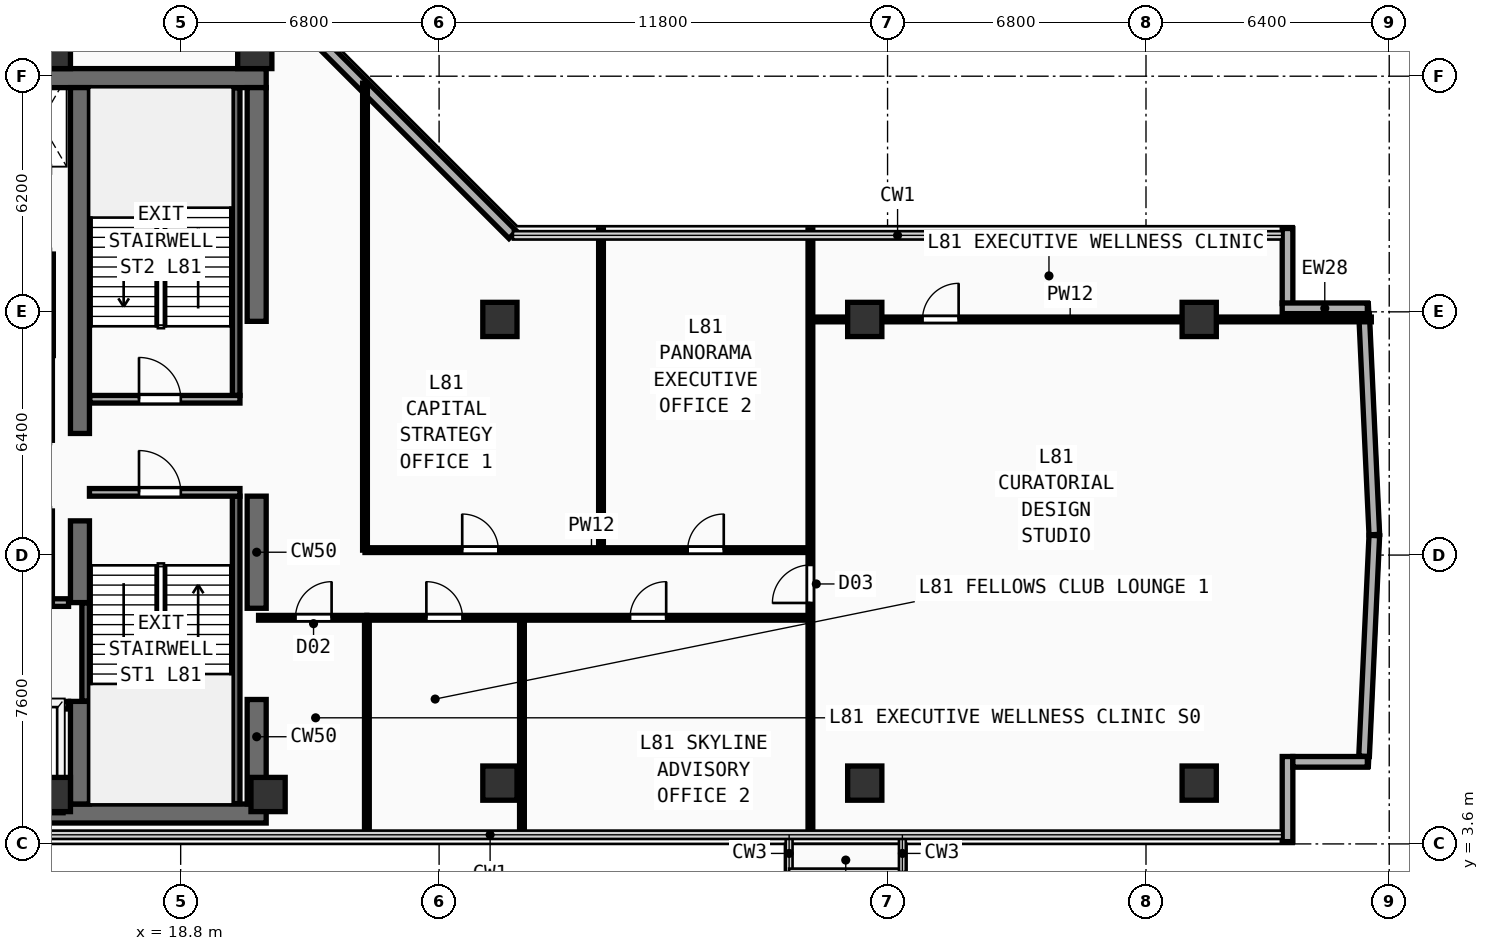
"""IFC4 building model, lengths in metres.
Left out: names, types, materials, properties, quantities, classifications, styles, units other than length and angle.
Written with IfcOpenShell. Run it as: python <this file> out.ifc"""

import sys

from ifc_helpers import new_model, si_unit, direction, frame, frame_2d, origin, origin_2d, place, context, subcontext, project, spatial, rectangle, extrude, element, fill, save


model = new_model("IFC4")
c1 = context("Model", 3, precision=1e-05, world=origin(), true_north=direction((0.0, 1.0)))
c2 = subcontext(c1, "Body", "Model", "MODEL_VIEW")
j1 = project(units=[si_unit("LENGTHUNIT", "METRE"), si_unit("PLANEANGLEUNIT", "RADIAN")], contexts=[c1])
p1 = place(None, origin())
s1 = spatial("IfcSite", under=j1, at=p1, CompositionType="ELEMENT")
p2 = place(p1, origin())
s2 = spatial("IfcBuilding", under=s1, at=p2, CompositionType="ELEMENT")
p3 = place(p2, frame((0.0, 0.0, 316.0)))
s3 = spatial("IfcBuildingStorey", under=s2, at=p3, CompositionType="ELEMENT", Elevation=316.0)
for number, where, z_axis, x_axis in (
    (1, (7.2, 4.4, 0.0), (0.0, 0.0, 1.0), (1.0, 0.0, 0.0)),
    (2, (7.2, 23.75, 0.0), (0.0, 0.0, 1.0), (1.0, 0.0, 0.0)),
):
    element("IfcWall", number, at=place(p3, frame(where, z_axis=z_axis, x_axis=x_axis)), inside=s3, PredefinedType="SHEAR", context=c2, shape_type="SweptSolid", body=[
        extrude(rectangle(XDim=13.85, YDim=0.5, at=frame_2d((6.925, 0.0))), origin(), (0.0, 0.0, 1.0), 3.56),
    ])
p4 = place(p3, frame((20.8, 4.65, 0.0), z_axis=(0.0, 0.0, 1.0), x_axis=(0.0, 1.0, 0.0)))
e3 = element("IfcWall", 3, at=p4, inside=s3, PredefinedType="SHEAR", context=c2, shape_type="SweptSolid", body=[
    extrude(rectangle(XDim=2.75, YDim=0.5, at=frame_2d((1.375, 0.0))), origin(), (0.0, 0.0, 1.0), 3.56),
])
p5 = place(p3, frame((20.8, 9.8, 0.0), z_axis=(0.0, 0.0, 1.0), x_axis=(0.0, 1.0, 0.0)))
e4 = element("IfcWall", 4, at=p5, inside=s3, PredefinedType="SHEAR", context=c2, shape_type="SweptSolid", body=[
    extrude(rectangle(XDim=2.95, YDim=0.5, at=frame_2d((1.475, 0.0))), origin(), (0.0, 0.0, 1.0), 3.56),
])
p6 = place(p3, frame((20.8, 17.35, 0.0), z_axis=(0.0, 0.0, 1.0), x_axis=(0.0, 1.0, 0.0)))
e5 = element("IfcWall", 5, at=p6, inside=s3, PredefinedType="SHEAR", context=c2, shape_type="SweptSolid", body=[
    extrude(rectangle(XDim=6.15, YDim=0.5, at=frame_2d((3.075, 0.0))), origin(), (0.0, 0.0, 1.0), 3.56),
])
p7 = place(p3, frame((16.15, 4.65, 0.0), z_axis=(0.0, 0.0, 1.0), x_axis=(0.0, 1.0, 0.0)))
e6 = element("IfcWall", 6, at=p7, inside=s3, PredefinedType="SHEAR", context=c2, shape_type="SweptSolid", body=[
    extrude(rectangle(XDim=2.7, YDim=0.5, at=frame_2d((1.35, 0.0))), origin(), (0.0, 0.0, 1.0), 3.56),
])
p8 = place(p3, frame((16.15, 9.95, 0.0), z_axis=(0.0, 0.0, 1.0), x_axis=(0.0, 1.0, 0.0)))
e7 = element("IfcWall", 7, at=p8, inside=s3, PredefinedType="SHEAR", context=c2, shape_type="SweptSolid", body=[
    extrude(rectangle(XDim=2.15, YDim=0.5, at=frame_2d((1.075, 0.0))), origin(), (0.0, 0.0, 1.0), 3.56),
])
p9 = place(p3, frame((16.15, 14.4, 0.0), z_axis=(0.0, 0.0, 1.0), x_axis=(0.0, 1.0, 0.0)))
e8 = element("IfcWall", 8, at=p9, inside=s3, PredefinedType="SHEAR", context=c2, shape_type="SweptSolid", body=[
    extrude(rectangle(XDim=9.1, YDim=0.5, at=frame_2d((4.55, 0.0))), origin(), (0.0, 0.0, 1.0), 3.56),
])
for number, where, z_axis, x_axis in (
    (9, (15.45, 4.9, 0.0), (0.0, 0.0, 1.0), (1.0, 0.0, 0.0)),
    (10, (21.1, 4.9, 0.0), (0.0, 0.0, 1.0), (1.0, 0.0, 0.0)),
    (11, (15.45, 24.45, 0.0), (0.0, 0.0, 1.0), (1.0, 0.0, 0.0)),
    (12, (20.75, 24.45, 0.0), (0.0, 0.0, 1.0), (1.0, 0.0, 0.0)),
    (13, (27.2, 5.2, 0.0), (0.0, 0.0, 1.0), (1.0, 0.0, 0.0)),
    (14, (36.8, 5.2, 0.0), (0.0, 0.0, 1.0), (1.0, 0.0, 0.0)),
    (15, (45.6, 5.2, 0.0), (0.0, 0.0, 1.0), (1.0, 0.0, 0.0)),
    (16, (27.2, 17.4, 0.0), (0.0, 0.0, 1.0), (1.0, 0.0, 0.0)),
    (17, (36.8, 17.4, 0.0), (0.0, 0.0, 1.0), (1.0, 0.0, 0.0)),
    (18, (45.6, 17.4, 0.0), (0.0, 0.0, 1.0), (1.0, 0.0, 0.0)),
):
    element("IfcColumn", number, at=place(p3, frame(where, z_axis=z_axis, x_axis=x_axis)), inside=s3, PredefinedType="COLUMN", context=c2, shape_type="SweptSolid", body=[
        extrude(rectangle(XDim=0.9, YDim=0.9, at=origin_2d()), origin(), (0.0, 0.0, 1.0), 3.56),
    ])
p10 = place(p3, frame((47.924, 3.66, 0.0), z_axis=(0.0, 0.0, 1.0), x_axis=(0.0, 1.0, 0.0)))
e19 = element("IfcWall", 19, at=p10, inside=s3, PredefinedType="SOLIDWALL", context=c2, shape_type="SweptSolid", body=[
    extrude(rectangle(XDim=2.24, YDim=0.28, at=frame_2d((1.12, 0.0))), origin(), (0.0, 0.0, 1.0), 3.56),
])
p11 = place(p3, frame((48.064, 5.76, 0.0), z_axis=(0.0, 0.0, 1.0), x_axis=(1.0, 0.0, 0.0)))
e20 = element("IfcWall", 20, at=p11, inside=s3, PredefinedType="SOLIDWALL", context=c2, shape_type="SweptSolid", body=[
    extrude(rectangle(XDim=1.96, YDim=0.28, at=frame_2d((0.98, 0.0))), origin(), (0.0, 0.0, 1.0), 3.56),
])
p12 = place(p3, frame((47.924, 17.818, 0.0), z_axis=(0.0, 0.0, 1.0), x_axis=(0.0, 1.0, 0.0)))
e21 = element("IfcWall", 21, at=p12, inside=s3, PredefinedType="SOLIDWALL", context=c2, shape_type="SweptSolid", body=[
    extrude(rectangle(XDim=1.975, YDim=0.28, at=frame_2d((0.987, 0.0))), origin(), (0.0, 0.0, 1.0), 3.56),
])
p13 = place(p3, frame((47.784, 17.693, 0.0), z_axis=(0.0, 0.0, 1.0), x_axis=(1.0, 0.0, 0.0)))
e22 = element("IfcWall", 22, at=p13, inside=s3, PredefinedType="SOLIDWALL", context=c2, shape_type="SweptSolid", body=[
    extrude(rectangle(XDim=2.24, YDim=0.28, at=frame_2d((1.12, 0.0))), origin(), (0.0, 0.0, 1.0), 3.56),
])
p14 = place(p3, frame((27.538, 19.628, 0.0), z_axis=(0.0, 0.0, 1.0), x_axis=(-0.707106781187, 0.707106781187, 0.0)))
e23 = element("IfcWall", 23, at=p14, inside=s3, PredefinedType="SOLIDWALL", context=c2, shape_type="SweptSolid", body=[
    extrude(rectangle(XDim=9.207, YDim=0.28, at=frame_2d((4.603, 0.0))), origin(), (0.0, 0.0, 1.0), 3.56),
])
p15 = place(p3, frame((49.938, 5.907, 0.0), z_axis=(0.0, 0.0, 1.0), x_axis=(0.046325924779, 0.998926378015, 0.0)))
e24 = element("IfcWall", 24, at=p15, inside=s3, PredefinedType="SOLIDWALL", context=c2, shape_type="SweptSolid", body=[
    extrude(rectangle(XDim=5.813, YDim=0.28, at=frame_2d((2.906, 0.0))), origin(), (0.0, 0.0, 1.0), 3.56),
])
p16 = place(p3, frame((50.208, 11.739, 0.0), z_axis=(0.0, 0.0, 1.0), x_axis=(-0.046327868457, 0.998926287873, 0.0)))
e25 = element("IfcWall", 25, at=p16, inside=s3, PredefinedType="SOLIDWALL", context=c2, shape_type="SweptSolid", body=[
    extrude(rectangle(XDim=5.813, YDim=0.28, at=frame_2d((2.906, 0.0))), origin(), (0.0, 0.0, 1.0), 3.56),
])
p17 = place(p3, frame((16.3, 7.36, 0.0), z_axis=(0.0, 0.0, 1.0), x_axis=(0.0, 1.0, 0.0)))
e26 = element("IfcWall", 26, at=p17, inside=s3, PredefinedType="SHEAR", context=c2, shape_type="SweptSolid", body=[
    extrude(rectangle(XDim=2.58, YDim=0.2, at=frame_2d((1.29, 0.0))), origin(), (0.0, 0.0, 1.0), 3.56),
])
p18 = place(p3, frame((20.26, 4.66, 0.0), z_axis=(0.0, 0.0, 1.0), x_axis=(0.0, 1.0, 0.0)))
e27 = element("IfcWall", 27, at=p18, inside=s3, PredefinedType="SHEAR", context=c2, shape_type="SweptSolid", body=[
    extrude(rectangle(XDim=8.09, YDim=0.2, at=frame_2d((4.045, 0.0))), origin(), (0.0, 0.0, 1.0), 3.56),
])
p19 = place(p3, frame((16.4, 12.85, 0.0), z_axis=(0.0, 0.0, 1.0), x_axis=(1.0, 0.0, 0.0)))
e28 = element("IfcWall", 28, at=p19, inside=s3, PredefinedType="PARTITIONING", context=c2, shape_type="SweptSolid", body=[
    extrude(rectangle(XDim=3.96, YDim=0.2, at=frame_2d((1.98, 0.0))), origin(), (0.0, 0.0, 1.0), 3.56),
])
p20 = place(p19, frame((1.304, 0.0, 0.0)))
e29 = element("IfcOpeningElement", 29, at=p20, cuts=e28, PredefinedType="OPENING", context=c2, shape_type="SweptSolid", body=[
    extrude(rectangle(XDim=1.1, YDim=2.2, at=frame_2d((0.55, 1.1))), frame((0.0, 0.11, 0.0), z_axis=(0.0, -1.0, 0.0), x_axis=(1.0, 0.0, 0.0)), (0.0, 0.0, 1.0), 0.22),
])
p21 = place(p3, frame((20.26, 15.4, 0.0), z_axis=(0.0, 0.0, 1.0), x_axis=(0.0, 1.0, 0.0)))
e30 = element("IfcWall", 30, at=p21, inside=s3, PredefinedType="SHEAR", context=c2, shape_type="SweptSolid", body=[
    extrude(rectangle(XDim=8.09, YDim=0.2, at=frame_2d((4.045, 0.0))), origin(), (0.0, 0.0, 1.0), 3.56),
])
p22 = place(p3, frame((16.41, 15.3, 0.0), z_axis=(0.0, 0.0, 1.0), x_axis=(1.0, 0.0, 0.0)))
e31 = element("IfcWall", 31, at=p22, inside=s3, PredefinedType="PARTITIONING", context=c2, shape_type="SweptSolid", body=[
    extrude(rectangle(XDim=3.95, YDim=0.2, at=frame_2d((1.975, 0.0))), origin(), (0.0, 0.0, 1.0), 3.56),
])
p23 = place(p22, frame((1.294, 0.0, 0.0)))
e32 = element("IfcOpeningElement", 32, at=p23, cuts=e31, PredefinedType="OPENING", context=c2, shape_type="SweptSolid", body=[
    extrude(rectangle(XDim=1.1, YDim=2.2, at=frame_2d((0.55, 1.1))), frame((0.0, 0.11, 0.0), z_axis=(0.0, -1.0, 0.0), x_axis=(1.0, 0.0, 0.0)), (0.0, 0.0, 1.0), 0.22),
])
p24 = place(p3, frame((7.5, 7.25, 0.0), z_axis=(0.0, 0.0, 1.0), x_axis=(1.0, 0.0, 0.0)))
e33 = element("IfcWall", 33, at=p24, inside=s3, PredefinedType="PARTITIONING", context=c2, shape_type="SweptSolid", body=[
    extrude(rectangle(XDim=8.35, YDim=0.2, at=frame_2d((4.175, 0.0))), origin(), (0.0, 0.0, 1.0), 3.56),
])
p25 = place(p24, frame((0.53, 0.0, 0.0)))
e34 = element("IfcOpeningElement", 34, at=p25, cuts=e33, PredefinedType="OPENING", context=c2, shape_type="SweptSolid", body=[
    extrude(rectangle(XDim=1.1, YDim=2.2, at=frame_2d((0.55, 1.1))), frame((0.0, 0.11, 0.0), z_axis=(0.0, -1.0, 0.0), x_axis=(1.0, 0.0, 0.0)), (0.0, 0.0, 1.0), 0.22),
])
p26 = place(p24, frame((2.37, 0.0, 0.0)))
e35 = element("IfcOpeningElement", 35, at=p26, cuts=e33, PredefinedType="OPENING", context=c2, shape_type="SweptSolid", body=[
    extrude(rectangle(XDim=1.1, YDim=2.2, at=frame_2d((0.55, 1.1))), frame((0.0, 0.11, 0.0), z_axis=(0.0, -1.0, 0.0), x_axis=(1.0, 0.0, 0.0)), (0.0, 0.0, 1.0), 0.22),
])
p27 = place(p24, frame((4.33, 0.0, 0.0)))
e36 = element("IfcOpeningElement", 36, at=p27, cuts=e33, PredefinedType="OPENING", context=c2, shape_type="SweptSolid", body=[
    extrude(rectangle(XDim=1.1, YDim=2.2, at=frame_2d((0.55, 1.1))), frame((0.0, 0.11, 0.0), z_axis=(0.0, -1.0, 0.0), x_axis=(1.0, 0.0, 0.0)), (0.0, 0.0, 1.0), 0.22),
])
p28 = place(p24, frame((6.5, 0.0, 0.0)))
e37 = element("IfcOpeningElement", 37, at=p28, cuts=e33, PredefinedType="OPENING", context=c2, shape_type="SweptSolid", body=[
    extrude(rectangle(XDim=1.1, YDim=2.2, at=frame_2d((0.55, 1.1))), frame((0.0, 0.11, 0.0), z_axis=(0.0, -1.0, 0.0), x_axis=(1.0, 0.0, 0.0)), (0.0, 0.0, 1.0), 0.22),
])
p29 = place(p3, frame((7.5, 9.95, 0.0), z_axis=(0.0, 0.0, 1.0), x_axis=(1.0, 0.0, 0.0)))
e38 = element("IfcWall", 38, at=p29, inside=s3, PredefinedType="PARTITIONING", context=c2, shape_type="SweptSolid", body=[
    extrude(rectangle(XDim=8.35, YDim=0.2, at=frame_2d((4.175, 0.0))), origin(), (0.0, 0.0, 1.0), 3.56),
])
p30 = place(p3, frame((15.35, 9.95, 0.0), z_axis=(0.0, 0.0, 1.0), x_axis=(0.0, 1.0, 0.0)))
e39 = element("IfcWall", 39, at=p30, inside=s3, PredefinedType="PARTITIONING", context=c2, shape_type="SweptSolid", body=[
    extrude(rectangle(XDim=2.41, YDim=0.15, at=frame_2d((1.205, 0.0))), origin(), (0.0, 0.0, 1.0), 3.56),
])
p31 = place(p3, frame((15.35, 14.22, 0.0), z_axis=(0.0, 0.0, 1.0), x_axis=(0.0, 1.0, 0.0)))
e40 = element("IfcWall", 40, at=p31, inside=s3, PredefinedType="PARTITIONING", context=c2, shape_type="SweptSolid", body=[
    extrude(rectangle(XDim=2.23, YDim=0.15, at=frame_2d((1.115, 0.0))), origin(), (0.0, 0.0, 1.0), 3.56),
])
p32 = place(p3, frame((15.35, 16.45, 0.0), z_axis=(0.0, 0.0, 1.0), x_axis=(0.0, 1.0, 0.0)))
e41 = element("IfcWall", 41, at=p32, inside=s3, PredefinedType="PARTITIONING", context=c2, shape_type="SweptSolid", body=[
    extrude(rectangle(XDim=2.67, YDim=0.2, at=frame_2d((1.335, 0.0))), origin(), (0.0, 0.0, 1.0), 3.56),
])
p33 = place(p3, frame((20.85, 9.55, 0.0), z_axis=(0.0, 0.0, 1.0), x_axis=(1.0, 0.0, 0.0)))
e42 = element("IfcWall", 42, at=p33, inside=s3, PredefinedType="PARTITIONING", context=c2, shape_type="SweptSolid", body=[
    extrude(rectangle(XDim=2.85, YDim=0.125, at=frame_2d((1.425, 0.0))), origin(), (0.0, 0.0, 1.0), 3.26),
])
p34 = place(p33, frame((0.971, 0.0, 0.0)))
e43 = element("IfcOpeningElement", 43, at=p34, cuts=e42, PredefinedType="OPENING", context=c2, shape_type="SweptSolid", body=[
    extrude(rectangle(XDim=0.95, YDim=2.15, at=frame_2d((0.475, 1.075))), frame((0.0, 0.073, 0.0), z_axis=(0.0, -1.0, 0.0), x_axis=(1.0, 0.0, 0.0)), (0.0, 0.0, 1.0), 0.145),
])
p35 = place(p3, frame((23.7, 3.84, 0.0), z_axis=(0.0, 0.0, 1.0), x_axis=(0.0, 1.0, 0.0)))
e44 = element("IfcWall", 44, at=p35, inside=s3, PredefinedType="PARTITIONING", context=c2, shape_type="SweptSolid", body=[
    extrude(rectangle(XDim=5.71, YDim=0.125, at=frame_2d((2.855, 0.0))), origin(), (0.0, 0.0, 1.0), 3.56),
])
p36 = place(p3, frame((23.7, 9.55, 0.0), z_axis=(0.0, 0.0, 1.0), x_axis=(1.0, 0.0, 0.0)))
e45 = element("IfcWall", 45, at=p36, inside=s3, PredefinedType="PARTITIONING", context=c2, shape_type="SweptSolid", body=[
    extrude(rectangle(XDim=11.67, YDim=0.125, at=frame_2d((5.835, 0.0))), origin(), (0.0, 0.0, 1.0), 3.26),
])
p37 = place(p36, frame((1.565, 0.0, 0.0)))
e46 = element("IfcOpeningElement", 46, at=p37, cuts=e45, PredefinedType="OPENING", context=c2, shape_type="SweptSolid", body=[
    extrude(rectangle(XDim=0.95, YDim=2.15, at=frame_2d((0.475, 1.075))), frame((0.0, 0.073, 0.0), z_axis=(0.0, -1.0, 0.0), x_axis=(1.0, 0.0, 0.0)), (0.0, 0.0, 1.0), 0.145),
])
p38 = place(p36, frame((6.925, 0.0, 0.0)))
e47 = element("IfcOpeningElement", 47, at=p38, cuts=e45, PredefinedType="OPENING", context=c2, shape_type="SweptSolid", body=[
    extrude(rectangle(XDim=0.95, YDim=2.15, at=frame_2d((0.475, 1.075))), frame((0.0, 0.073, 0.0), z_axis=(0.0, -1.0, 0.0), x_axis=(1.0, 0.0, 0.0)), (0.0, 0.0, 1.0), 0.145),
])
p39 = place(p3, frame((27.78, 3.84, 0.0), z_axis=(0.0, 0.0, 1.0), x_axis=(0.0, 1.0, 0.0)))
e48 = element("IfcWall", 48, at=p39, inside=s3, PredefinedType="PARTITIONING", context=c2, shape_type="SweptSolid", body=[
    extrude(rectangle(XDim=5.71, YDim=0.125, at=frame_2d((2.855, 0.0))), origin(), (0.0, 0.0, 1.0), 3.56),
])
p40 = place(p3, frame((35.37, 3.84, 0.0), z_axis=(0.0, 0.0, 1.0), x_axis=(0.0, 1.0, 0.0)))
e49 = element("IfcWall", 49, at=p40, inside=s3, PredefinedType="PARTITIONING", context=c2, shape_type="SweptSolid", body=[
    extrude(rectangle(XDim=15.92, YDim=0.125, at=frame_2d((7.96, 0.0))), origin(), (0.0, 0.0, 1.0), 3.56),
])
p41 = place(p40, frame((6.1, 0.0, 0.0)))
e50 = element("IfcOpeningElement", 50, at=p41, cuts=e49, PredefinedType="OPENING", context=c2, shape_type="SweptSolid", body=[
    extrude(rectangle(XDim=1.0, YDim=2.2, at=frame_2d((0.5, 1.1))), frame((0.0, 0.073, 0.0), z_axis=(0.0, -1.0, 0.0), x_axis=(1.0, 0.0, 0.0)), (0.0, 0.0, 1.0), 0.145),
])
p42 = place(p3, frame((35.37, 17.4, 0.0), z_axis=(0.0, 0.0, 1.0), x_axis=(1.0, 0.0, 0.0)))
e51 = element("IfcWall", 51, at=p42, inside=s3, PredefinedType="PARTITIONING", context=c2, shape_type="SweptSolid", body=[
    extrude(rectangle(XDim=14.758, YDim=0.125, at=frame_2d((7.379, 0.0))), origin(), (0.0, 0.0, 1.0), 3.26),
])
p43 = place(p42, frame((2.95, 0.0, 0.0)))
e52 = element("IfcOpeningElement", 52, at=p43, cuts=e51, PredefinedType="OPENING", context=c2, shape_type="SweptSolid", body=[
    extrude(rectangle(XDim=0.95, YDim=2.15, at=frame_2d((0.475, 1.075))), frame((0.0, 0.073, 0.0), z_axis=(0.0, -1.0, 0.0), x_axis=(1.0, 0.0, 0.0)), (0.0, 0.0, 1.0), 0.145),
])
p44 = place(p3, frame((23.65, 11.33, 0.0), z_axis=(0.0, 0.0, 1.0), x_axis=(0.0, 1.0, 0.0)))
e53 = element("IfcWall", 53, at=p44, inside=s3, PredefinedType="PARTITIONING", context=c2, shape_type="SweptSolid", body=[
    extrude(rectangle(XDim=12.285, YDim=0.125, at=frame_2d((6.143, 0.0))), origin(), (0.0, 0.0, 1.0), 3.56),
])
p45 = place(p3, frame((23.65, 11.33, 0.0), z_axis=(0.0, 0.0, 1.0), x_axis=(1.0, 0.0, 0.0)))
e54 = element("IfcWall", 54, at=p45, inside=s3, PredefinedType="PARTITIONING", context=c2, shape_type="SweptSolid", body=[
    extrude(rectangle(XDim=11.72, YDim=0.125, at=frame_2d((5.86, 0.0))), origin(), (0.0, 0.0, 1.0), 3.56),
])
p46 = place(p45, frame((2.558, 0.0, 0.0)))
e55 = element("IfcOpeningElement", 55, at=p46, cuts=e54, PredefinedType="OPENING", context=c2, shape_type="SweptSolid", body=[
    extrude(rectangle(XDim=0.95, YDim=2.15, at=frame_2d((0.475, 1.075))), frame((0.0, 0.073, 0.0), z_axis=(0.0, -1.0, 0.0), x_axis=(1.0, 0.0, 0.0)), (0.0, 0.0, 1.0), 0.145),
])
p47 = place(p45, frame((8.49, 0.0, 0.0)))
e56 = element("IfcOpeningElement", 56, at=p47, cuts=e54, PredefinedType="OPENING", context=c2, shape_type="SweptSolid", body=[
    extrude(rectangle(XDim=0.95, YDim=2.15, at=frame_2d((0.475, 1.075))), frame((0.0, 0.073, 0.0), z_axis=(0.0, -1.0, 0.0), x_axis=(1.0, 0.0, 0.0)), (0.0, 0.0, 1.0), 0.145),
])
p48 = place(p3, frame((29.86, 11.33, 0.0), z_axis=(0.0, 0.0, 1.0), x_axis=(0.0, 1.0, 0.0)))
e57 = element("IfcWall", 57, at=p48, inside=s3, PredefinedType="PARTITIONING", context=c2, shape_type="SweptSolid", body=[
    extrude(rectangle(XDim=8.43, YDim=0.125, at=frame_2d((4.215, 0.0))), origin(), (0.0, 0.0, 1.0), 3.56),
])
p49 = place(p20, frame((1.1, 0.0, 0.0), z_axis=(0.0, 0.0, 1.0), x_axis=(-1.0, 0.0, 0.0)))
e58 = element("IfcDoor", 58, at=p49, inside=s3, OperationType="SINGLE_SWING_RIGHT", PredefinedType="DOOR", context=c2, shape_type="SweptSolid", body=[
    extrude(rectangle(XDim=1.1, YDim=2.2, at=frame_2d((0.55, 1.1))), frame((0.0, 0.025, 0.0), z_axis=(0.0, -1.0, 0.0), x_axis=(1.0, 0.0, 0.0)), (0.0, 0.0, 1.0), 0.05),
])
fill(e29, e58)
p50 = place(p23, origin())
e59 = element("IfcDoor", 59, at=p50, inside=s3, OperationType="SINGLE_SWING_LEFT", PredefinedType="DOOR", context=c2, shape_type="SweptSolid", body=[
    extrude(rectangle(XDim=1.1, YDim=2.2, at=frame_2d((0.55, 1.1))), frame((0.0, 0.025, 0.0), z_axis=(0.0, -1.0, 0.0), x_axis=(1.0, 0.0, 0.0)), (0.0, 0.0, 1.0), 0.05),
])
fill(e32, e59)
p51 = place(p34, origin())
e60 = element("IfcDoor", 60, at=p51, inside=s3, OperationType="SINGLE_SWING_RIGHT", PredefinedType="DOOR", context=c2, shape_type="SweptSolid", body=[
    extrude(rectangle(XDim=0.95, YDim=2.15, at=frame_2d((0.475, 1.075))), frame((0.0, 0.025, 0.0), z_axis=(0.0, -1.0, 0.0), x_axis=(1.0, 0.0, 0.0)), (0.0, 0.0, 1.0), 0.05),
])
fill(e43, e60)
p52 = place(p37, origin())
e61 = element("IfcDoor", 61, at=p52, inside=s3, OperationType="SINGLE_SWING_LEFT", PredefinedType="DOOR", context=c2, shape_type="SweptSolid", body=[
    extrude(rectangle(XDim=0.95, YDim=2.15, at=frame_2d((0.475, 1.075))), frame((0.0, 0.025, 0.0), z_axis=(0.0, -1.0, 0.0), x_axis=(1.0, 0.0, 0.0)), (0.0, 0.0, 1.0), 0.05),
])
fill(e46, e61)
p53 = place(p38, origin())
e62 = element("IfcDoor", 62, at=p53, inside=s3, OperationType="SINGLE_SWING_RIGHT", PredefinedType="DOOR", context=c2, shape_type="SweptSolid", body=[
    extrude(rectangle(XDim=0.95, YDim=2.15, at=frame_2d((0.475, 1.075))), frame((0.0, 0.025, 0.0), z_axis=(0.0, -1.0, 0.0), x_axis=(1.0, 0.0, 0.0)), (0.0, 0.0, 1.0), 0.05),
])
fill(e47, e62)
p54 = place(p41, origin())
e63 = element("IfcDoor", 63, at=p54, inside=s3, OperationType="SINGLE_SWING_LEFT", PredefinedType="DOOR", context=c2, shape_type="SweptSolid", body=[
    extrude(rectangle(XDim=1.0, YDim=2.2, at=frame_2d((0.5, 1.1))), frame((0.0, 0.025, 0.0), z_axis=(0.0, -1.0, 0.0), x_axis=(1.0, 0.0, 0.0)), (0.0, 0.0, 1.0), 0.05),
])
fill(e50, e63)
p55 = place(p43, origin())
e64 = element("IfcDoor", 64, at=p55, inside=s3, OperationType="SINGLE_SWING_RIGHT", PredefinedType="DOOR", context=c2, shape_type="SweptSolid", body=[
    extrude(rectangle(XDim=0.95, YDim=2.15, at=frame_2d((0.475, 1.075))), frame((0.0, 0.025, 0.0), z_axis=(0.0, -1.0, 0.0), x_axis=(1.0, 0.0, 0.0)), (0.0, 0.0, 1.0), 0.05),
])
fill(e52, e64)
p56 = place(p46, origin())
e65 = element("IfcDoor", 65, at=p56, inside=s3, OperationType="SINGLE_SWING_LEFT", PredefinedType="DOOR", context=c2, shape_type="SweptSolid", body=[
    extrude(rectangle(XDim=0.95, YDim=2.15, at=frame_2d((0.475, 1.075))), frame((0.0, 0.025, 0.0), z_axis=(0.0, -1.0, 0.0), x_axis=(1.0, 0.0, 0.0)), (0.0, 0.0, 1.0), 0.05),
])
fill(e55, e65)
p57 = place(p47, origin())
e66 = element("IfcDoor", 66, at=p57, inside=s3, OperationType="SINGLE_SWING_RIGHT", PredefinedType="DOOR", context=c2, shape_type="SweptSolid", body=[
    extrude(rectangle(XDim=0.95, YDim=2.15, at=frame_2d((0.475, 1.075))), frame((0.0, 0.025, 0.0), z_axis=(0.0, -1.0, 0.0), x_axis=(1.0, 0.0, 0.0)), (0.0, 0.0, 1.0), 0.05),
])
fill(e56, e66)
save(model, sys.argv[1])
